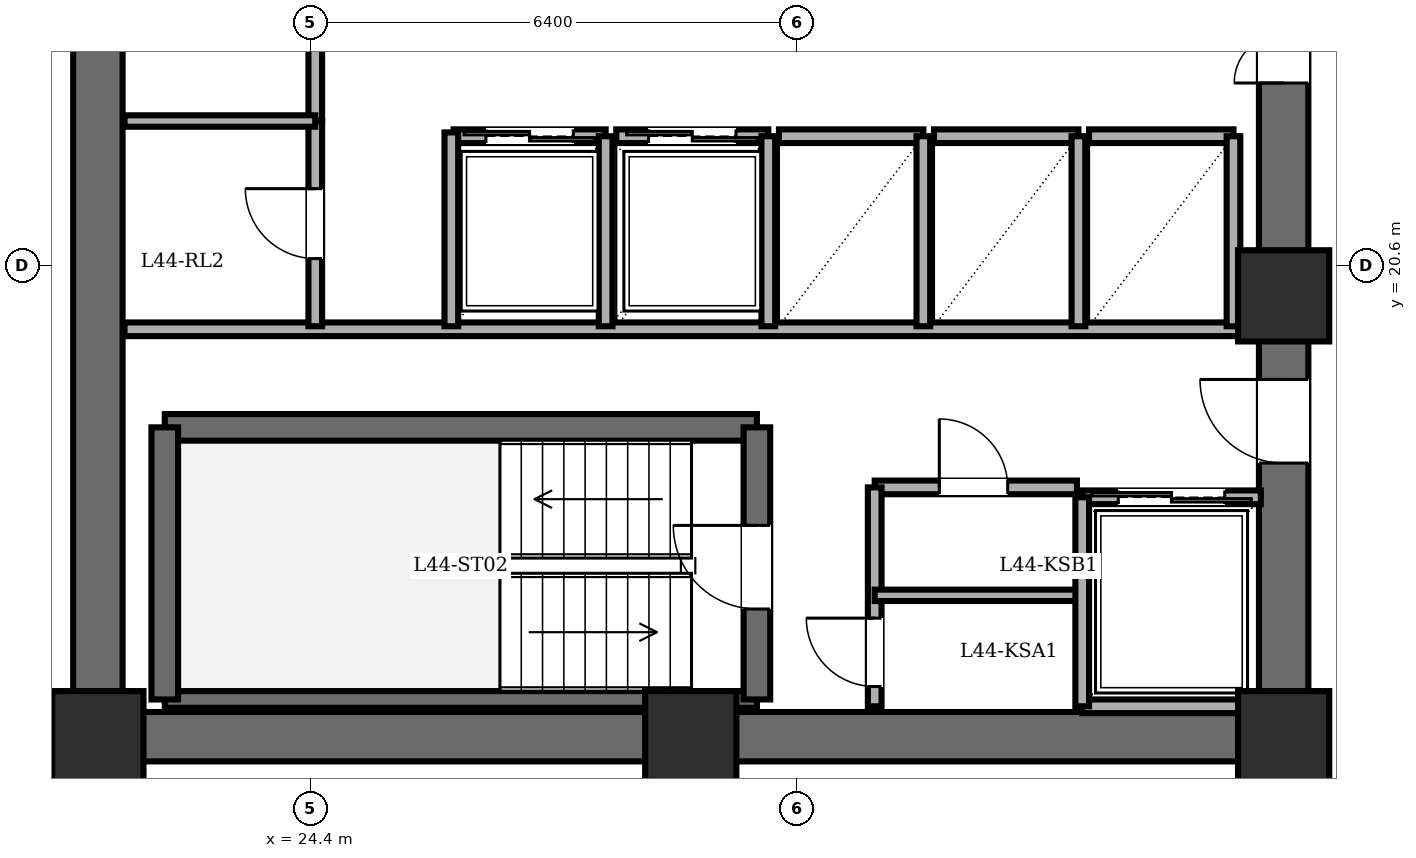
"""IFC4 building model, lengths in metres.
Left out: names, types, materials, properties, quantities, classifications, styles, units other than length and angle.
Written with IfcOpenShell. Run it as: python <this file> out.ifc"""

import sys

from ifc_helpers import new_model, si_unit, direction, frame, frame_2d, origin, origin_2d, place, context, subcontext, project, spatial, rectangle, extrude, element, fill, save


model = new_model("IFC4")
c1 = context("Model", 3, precision=1e-05, world=origin(), true_north=direction((0.0, 1.0)))
c2 = subcontext(c1, "Body", "Model", "MODEL_VIEW")
j1 = project(units=[si_unit("LENGTHUNIT", "METRE"), si_unit("PLANEANGLEUNIT", "RADIAN")], contexts=[c1])
p1 = place(None, origin())
s1 = spatial("IfcSite", under=j1, at=p1, CompositionType="ELEMENT")
p2 = place(p1, origin())
s2 = spatial("IfcBuilding", under=s1, at=p2, CompositionType="ELEMENT")
p3 = place(p2, frame((0.0, 0.0, 169.0)))
s3 = spatial("IfcBuildingStorey", under=s2, at=p3, CompositionType="ELEMENT", Elevation=169.0)
for number, where, z_axis, x_axis in (
    (1, (21.6, 14.4, 0.0), (0.0, 0.0, 1.0), (1.0, 0.0, 0.0)),
    (2, (29.4, 14.4, 0.0), (0.0, 0.0, 1.0), (1.0, 0.0, 0.0)),
    (3, (37.2, 14.4, 0.0), (0.0, 0.0, 1.0), (1.0, 0.0, 0.0)),
    (4, (37.2, 20.2, 0.0), (0.0, 0.0, 1.0), (1.0, 0.0, 0.0)),
):
    element("IfcColumn", number, at=place(p3, frame(where, z_axis=z_axis, x_axis=x_axis)), inside=s3, PredefinedType="COLUMN", context=c2, shape_type="SweptSolid", body=[
        extrude(rectangle(XDim=1.2, YDim=1.2, at=origin_2d()), origin(), (0.0, 0.0, 1.0), 3.6),
    ])
p4 = place(p3, frame((21.6, 14.4, 0.0), z_axis=(0.0, 0.0, 1.0), x_axis=(0.0, 1.0, 0.0)))
e5 = element("IfcWall", 5, at=p4, inside=s3, PredefinedType="SHEAR", context=c2, shape_type="SweptSolid", body=[
    extrude(rectangle(XDim=19.2, YDim=0.65, at=frame_2d((9.6, 0.0))), origin(), (0.0, 0.0, 1.0), 3.4),
])
p5 = place(p3, frame((37.2, 14.4, 0.0), z_axis=(0.0, 0.0, 1.0), x_axis=(-1.0, 0.0, 0.0)))
e6 = element("IfcWall", 6, at=p5, inside=s3, PredefinedType="SHEAR", context=c2, shape_type="SweptSolid", body=[
    extrude(rectangle(XDim=15.6, YDim=0.65, at=frame_2d((7.8, 0.0))), origin(), (0.0, 0.0, 1.0), 3.4),
])
p6 = place(p3, frame((37.2, 14.4, 0.0), z_axis=(0.0, 0.0, 1.0), x_axis=(0.0, 1.0, 0.0)))
e7 = element("IfcWall", 7, at=p6, inside=s3, PredefinedType="SHEAR", context=c2, shape_type="SweptSolid", body=[
    extrude(rectangle(XDim=19.2, YDim=0.65, at=frame_2d((9.6, 0.0))), origin(), (0.0, 0.0, 1.0), 3.4),
])
p7 = place(p6, frame((15.8, 0.0, 0.0)))
e8 = element("IfcOpeningElement", 8, at=p7, cuts=e7, PredefinedType="OPENING", context=c2, shape_type="SweptSolid", body=[
    extrude(rectangle(XDim=1.15, YDim=2.15, at=frame_2d((0.575, 1.075))), frame((0.0, 0.335, 0.0), z_axis=(0.0, -1.0, 0.0), x_axis=(1.0, 0.0, 0.0)), (0.0, 0.0, 1.0), 0.67),
])
p8 = place(p6, frame((3.6, 0.0, 0.0)))
e9 = element("IfcOpeningElement", 9, at=p8, cuts=e7, PredefinedType="OPENING", context=c2, shape_type="SweptSolid", body=[
    extrude(rectangle(XDim=1.1, YDim=2.15, at=frame_2d((0.55, 1.075))), frame((0.0, 0.335, 0.0), z_axis=(0.0, -1.0, 0.0), x_axis=(1.0, 0.0, 0.0)), (0.0, 0.0, 1.0), 0.67),
])
p9 = place(p6, frame((8.6, 0.0, 0.0)))
e10 = element("IfcOpeningElement", 10, at=p9, cuts=e7, PredefinedType="OPENING", context=c2, shape_type="SweptSolid", body=[
    extrude(rectangle(XDim=1.3, YDim=2.2, at=frame_2d((0.65, 1.1))), frame((0.0, 0.335, 0.0), z_axis=(0.0, -1.0, 0.0), x_axis=(1.0, 0.0, 0.0)), (0.0, 0.0, 1.0), 0.67),
])
p10 = place(p3, frame((22.48, 18.47, 0.0), z_axis=(0.0, 0.0, 1.0), x_axis=(1.0, 0.0, 0.0)))
e11 = element("IfcWall", 11, at=p10, inside=s3, PredefinedType="SOLIDWALL", context=c2, shape_type="SweptSolid", body=[
    extrude(rectangle(XDim=7.79, YDim=0.35, at=frame_2d((3.895, 0.0))), origin(), (0.0, 0.0, 1.0), 3.4),
])
p11 = place(p3, frame((22.48, 14.89, 0.0), z_axis=(0.0, 0.0, 1.0), x_axis=(1.0, 0.0, 0.0)))
e12 = element("IfcWall", 12, at=p11, inside=s3, PredefinedType="PARTITIONING", context=c2, shape_type="SweptSolid", body=[
    extrude(rectangle(XDim=7.79, YDim=0.22, at=frame_2d((3.895, 0.0))), origin(), (0.0, 0.0, 1.0), 3.4),
])
p12 = place(p3, frame((22.48, 14.89, 0.0), z_axis=(0.0, 0.0, 1.0), x_axis=(0.0, 1.0, 0.0)))
e13 = element("IfcWall", 13, at=p12, inside=s3, PredefinedType="SOLIDWALL", context=c2, shape_type="SweptSolid", body=[
    extrude(rectangle(XDim=3.58, YDim=0.35, at=frame_2d((1.79, 0.0))), origin(), (0.0, 0.0, 1.0), 3.4),
])
p13 = place(p3, frame((30.27, 14.89, 0.0), z_axis=(0.0, 0.0, 1.0), x_axis=(0.0, 1.0, 0.0)))
e14 = element("IfcWall", 14, at=p13, inside=s3, PredefinedType="SOLIDWALL", context=c2, shape_type="SweptSolid", body=[
    extrude(rectangle(XDim=3.58, YDim=0.35, at=frame_2d((1.79, 0.0))), origin(), (0.0, 0.0, 1.0), 3.4),
])
p14 = place(p13, frame((1.19, 0.0, 0.0)))
e15 = element("IfcOpeningElement", 15, at=p14, cuts=e14, PredefinedType="OPENING", context=c2, shape_type="SweptSolid", body=[
    extrude(rectangle(XDim=1.1, YDim=2.15, at=frame_2d((0.55, 1.075))), frame((0.0, 0.185, 0.0), z_axis=(0.0, -1.0, 0.0), x_axis=(1.0, 0.0, 0.0)), (0.0, 0.0, 1.0), 0.37),
])
p15 = place(p3, frame((21.95, 19.76, 0.0), z_axis=(0.0, 0.0, 1.0), x_axis=(1.0, 0.0, 0.0)))
e16 = element("IfcWall", 16, at=p15, inside=s3, PredefinedType="PARTITIONING", context=c2, shape_type="SweptSolid", body=[
    extrude(rectangle(XDim=14.87, YDim=0.18, at=frame_2d((7.435, 0.0))), origin(), (0.0, 0.0, 1.0), 3.4),
])
p16 = place(p3, frame((31.82, 17.68, 0.0), z_axis=(0.0, 0.0, 1.0), x_axis=(1.0, 0.0, 0.0)))
e17 = element("IfcWall", 17, at=p16, inside=s3, PredefinedType="PARTITIONING", context=c2, shape_type="SweptSolid", body=[
    extrude(rectangle(XDim=2.66, YDim=0.18, at=frame_2d((1.33, 0.0))), origin(), (0.0, 0.0, 1.0), 3.4),
])
p17 = place(p16, frame((0.85, 0.0, 0.0)))
e18 = element("IfcOpeningElement", 18, at=p17, cuts=e17, PredefinedType="OPENING", context=c2, shape_type="SweptSolid", body=[
    extrude(rectangle(XDim=0.9, YDim=2.05, at=frame_2d((0.45, 1.025))), frame((0.0, 0.1, 0.0), z_axis=(0.0, -1.0, 0.0), x_axis=(1.0, 0.0, 0.0)), (0.0, 0.0, 1.0), 0.2),
])
p18 = place(p3, frame((31.82, 14.8, 0.0), z_axis=(0.0, 0.0, 1.0), x_axis=(0.0, 1.0, 0.0)))
e19 = element("IfcWall", 19, at=p18, inside=s3, PredefinedType="PARTITIONING", context=c2, shape_type="SweptSolid", body=[
    extrude(rectangle(XDim=2.88, YDim=0.18, at=frame_2d((1.44, 0.0))), origin(), (0.0, 0.0, 1.0), 3.4),
])
p19 = place(p18, frame((0.26, 0.0, 0.0)))
e20 = element("IfcOpeningElement", 20, at=p19, cuts=e19, PredefinedType="OPENING", context=c2, shape_type="SweptSolid", body=[
    extrude(rectangle(XDim=0.9, YDim=2.05, at=frame_2d((0.45, 1.025))), frame((0.0, 0.1, 0.0), z_axis=(0.0, -1.0, 0.0), x_axis=(1.0, 0.0, 0.0)), (0.0, 0.0, 1.0), 0.2),
])
p20 = place(p3, frame((31.82, 16.26, 0.0), z_axis=(0.0, 0.0, 1.0), x_axis=(1.0, 0.0, 0.0)))
e21 = element("IfcWall", 21, at=p20, inside=s3, PredefinedType="PARTITIONING", context=c2, shape_type="SweptSolid", body=[
    extrude(rectangle(XDim=2.66, YDim=0.15, at=frame_2d((1.33, 0.0))), origin(), (0.0, 0.0, 1.0), 3.4),
])
p21 = place(p3, frame((34.55, 17.55, 0.0), z_axis=(0.0, 0.0, 1.0), x_axis=(1.0, 0.0, 0.0)))
e22 = element("IfcWall", 22, at=p21, inside=s3, PredefinedType="PARTITIONING", context=c2, shape_type="SweptSolid", body=[
    extrude(rectangle(XDim=2.35, YDim=0.18, at=frame_2d((1.175, 0.0))), origin(), (0.0, 0.0, 1.0), 3.4),
])
p22 = place(p21, frame((0.475, 0.0, 0.0)))
e23 = element("IfcOpeningElement", 23, at=p22, cuts=e22, PredefinedType="OPENING", context=c2, shape_type="SweptSolid", body=[
    extrude(rectangle(XDim=1.4, YDim=2.3, at=frame_2d((0.7, 1.15))), frame((0.0, 0.1, 0.0), z_axis=(0.0, -1.0, 0.0), x_axis=(1.0, 0.0, 0.0)), (0.0, 0.0, 1.0), 0.2),
])
p23 = place(p3, frame((36.9, 14.8, 0.0), z_axis=(0.0, 0.0, 1.0), x_axis=(-1.0, 0.0, 0.0)))
e24 = element("IfcWall", 24, at=p23, inside=s3, PredefinedType="PARTITIONING", context=c2, shape_type="SweptSolid", body=[
    extrude(rectangle(XDim=2.35, YDim=0.18, at=frame_2d((1.175, 0.0))), origin(), (0.0, 0.0, 1.0), 3.4),
])
p24 = place(p3, frame((34.55, 17.55, 0.0), z_axis=(0.0, 0.0, 1.0), x_axis=(0.0, -1.0, 0.0)))
e25 = element("IfcWall", 25, at=p24, inside=s3, PredefinedType="PARTITIONING", context=c2, shape_type="SweptSolid", body=[
    extrude(rectangle(XDim=2.75, YDim=0.18, at=frame_2d((1.375, 0.0))), origin(), (0.0, 0.0, 1.0), 3.4),
])
p25 = place(p3, frame((26.28, 22.3, 0.0), z_axis=(0.0, 0.0, 1.0), x_axis=(1.0, 0.0, 0.0)))
e26 = element("IfcWall", 26, at=p25, inside=s3, PredefinedType="PARTITIONING", context=c2, shape_type="SweptSolid", body=[
    extrude(rectangle(XDim=2.0, YDim=0.18, at=frame_2d((1.0, 0.0))), origin(), (0.0, 0.0, 1.0), 3.4),
])
p26 = place(p25, frame((0.425, 0.0, 0.0)))
e27 = element("IfcOpeningElement", 27, at=p26, cuts=e26, PredefinedType="OPENING", context=c2, shape_type="SweptSolid", body=[
    extrude(rectangle(XDim=1.15, YDim=2.2, at=frame_2d((0.575, 1.1))), frame((0.0, 0.1, 0.0), z_axis=(0.0, -1.0, 0.0), x_axis=(1.0, 0.0, 0.0)), (0.0, 0.0, 1.0), 0.2),
])
p27 = place(p3, frame((28.28, 19.8, 0.0), z_axis=(0.0, 0.0, 1.0), x_axis=(0.0, 1.0, 0.0)))
e28 = element("IfcWall", 28, at=p27, inside=s3, PredefinedType="PARTITIONING", context=c2, shape_type="SweptSolid", body=[
    extrude(rectangle(XDim=2.5, YDim=0.18, at=frame_2d((1.25, 0.0))), origin(), (0.0, 0.0, 1.0), 3.4),
])
p28 = place(p3, frame((28.42, 22.3, 0.0), z_axis=(0.0, 0.0, 1.0), x_axis=(1.0, 0.0, 0.0)))
e29 = element("IfcWall", 29, at=p28, inside=s3, PredefinedType="PARTITIONING", context=c2, shape_type="SweptSolid", body=[
    extrude(rectangle(XDim=2.0, YDim=0.18, at=frame_2d((1.0, 0.0))), origin(), (0.0, 0.0, 1.0), 3.4),
])
p29 = place(p28, frame((0.425, 0.0, 0.0)))
e30 = element("IfcOpeningElement", 30, at=p29, cuts=e29, PredefinedType="OPENING", context=c2, shape_type="SweptSolid", body=[
    extrude(rectangle(XDim=1.15, YDim=2.2, at=frame_2d((0.575, 1.1))), frame((0.0, 0.1, 0.0), z_axis=(0.0, -1.0, 0.0), x_axis=(1.0, 0.0, 0.0)), (0.0, 0.0, 1.0), 0.2),
])
p30 = place(p3, frame((30.42, 19.8, 0.0), z_axis=(0.0, 0.0, 1.0), x_axis=(0.0, 1.0, 0.0)))
e31 = element("IfcWall", 31, at=p30, inside=s3, PredefinedType="PARTITIONING", context=c2, shape_type="SweptSolid", body=[
    extrude(rectangle(XDim=2.5, YDim=0.18, at=frame_2d((1.25, 0.0))), origin(), (0.0, 0.0, 1.0), 3.4),
])
p31 = place(p3, frame((30.56, 22.3, 0.0), z_axis=(0.0, 0.0, 1.0), x_axis=(1.0, 0.0, 0.0)))
e32 = element("IfcWall", 32, at=p31, inside=s3, PredefinedType="PARTITIONING", context=c2, shape_type="SweptSolid", body=[
    extrude(rectangle(XDim=1.9, YDim=0.18, at=frame_2d((0.95, 0.0))), origin(), (0.0, 0.0, 1.0), 3.4),
])
p32 = place(p3, frame((32.46, 19.8, 0.0), z_axis=(0.0, 0.0, 1.0), x_axis=(0.0, 1.0, 0.0)))
e33 = element("IfcWall", 33, at=p32, inside=s3, PredefinedType="PARTITIONING", context=c2, shape_type="SweptSolid", body=[
    extrude(rectangle(XDim=2.5, YDim=0.18, at=frame_2d((1.25, 0.0))), origin(), (0.0, 0.0, 1.0), 3.4),
])
p33 = place(p3, frame((32.6, 22.3, 0.0), z_axis=(0.0, 0.0, 1.0), x_axis=(1.0, 0.0, 0.0)))
e34 = element("IfcWall", 34, at=p33, inside=s3, PredefinedType="PARTITIONING", context=c2, shape_type="SweptSolid", body=[
    extrude(rectangle(XDim=1.9, YDim=0.18, at=frame_2d((0.95, 0.0))), origin(), (0.0, 0.0, 1.0), 3.4),
])
p34 = place(p3, frame((34.5, 19.8, 0.0), z_axis=(0.0, 0.0, 1.0), x_axis=(0.0, 1.0, 0.0)))
e35 = element("IfcWall", 35, at=p34, inside=s3, PredefinedType="PARTITIONING", context=c2, shape_type="SweptSolid", body=[
    extrude(rectangle(XDim=2.5, YDim=0.18, at=frame_2d((1.25, 0.0))), origin(), (0.0, 0.0, 1.0), 3.4),
])
p35 = place(p3, frame((34.64, 22.3, 0.0), z_axis=(0.0, 0.0, 1.0), x_axis=(1.0, 0.0, 0.0)))
e36 = element("IfcWall", 36, at=p35, inside=s3, PredefinedType="PARTITIONING", context=c2, shape_type="SweptSolid", body=[
    extrude(rectangle(XDim=1.9, YDim=0.18, at=frame_2d((0.95, 0.0))), origin(), (0.0, 0.0, 1.0), 3.4),
])
p36 = place(p3, frame((36.54, 19.8, 0.0), z_axis=(0.0, 0.0, 1.0), x_axis=(0.0, 1.0, 0.0)))
e37 = element("IfcWall", 37, at=p36, inside=s3, PredefinedType="PARTITIONING", context=c2, shape_type="SweptSolid", body=[
    extrude(rectangle(XDim=2.5, YDim=0.18, at=frame_2d((1.25, 0.0))), origin(), (0.0, 0.0, 1.0), 3.4),
])
p37 = place(p3, frame((24.46, 22.5, 0.0), z_axis=(0.0, 0.0, 1.0), x_axis=(0.0, 1.0, 0.0)))
e38 = element("IfcWall", 38, at=p37, inside=s3, PredefinedType="PARTITIONING", context=c2, shape_type="SweptSolid", body=[
    extrude(rectangle(XDim=5.0, YDim=0.18, at=frame_2d((2.5, 0.0))), origin(), (0.0, 0.0, 1.0), 3.4),
])
p38 = place(p37, frame((2.04, 0.0, 0.0)))
e39 = element("IfcOpeningElement", 39, at=p38, cuts=e38, PredefinedType="OPENING", context=c2, shape_type="SweptSolid", body=[
    extrude(rectangle(XDim=0.92, YDim=2.1, at=frame_2d((0.46, 1.05))), frame((0.0, 0.1, 0.0), z_axis=(0.0, -1.0, 0.0), x_axis=(1.0, 0.0, 0.0)), (0.0, 0.0, 1.0), 0.2),
])
p39 = place(p3, frame((24.46, 19.8, 0.0), z_axis=(0.0, 0.0, 1.0), x_axis=(0.0, 1.0, 0.0)))
e40 = element("IfcWall", 40, at=p39, inside=s3, PredefinedType="PARTITIONING", context=c2, shape_type="SweptSolid", body=[
    extrude(rectangle(XDim=2.7, YDim=0.18, at=frame_2d((1.35, 0.0))), origin(), (0.0, 0.0, 1.0), 3.4),
])
p40 = place(p39, frame((0.89, 0.0, 0.0)))
e41 = element("IfcOpeningElement", 41, at=p40, cuts=e40, PredefinedType="OPENING", context=c2, shape_type="SweptSolid", body=[
    extrude(rectangle(XDim=0.92, YDim=2.1, at=frame_2d((0.46, 1.05))), frame((0.0, 0.1, 0.0), z_axis=(0.0, -1.0, 0.0), x_axis=(1.0, 0.0, 0.0)), (0.0, 0.0, 1.0), 0.2),
])
p41 = place(p3, frame((21.95, 22.5, 0.0), z_axis=(0.0, 0.0, 1.0), x_axis=(1.0, 0.0, 0.0)))
e42 = element("IfcWall", 42, at=p41, inside=s3, PredefinedType="PARTITIONING", context=c2, shape_type="SweptSolid", body=[
    extrude(rectangle(XDim=2.51, YDim=0.15, at=frame_2d((1.255, 0.0))), origin(), (0.0, 0.0, 1.0), 3.4),
])
p42 = place(p3, frame((26.25, 19.8, 0.0), z_axis=(0.0, 0.0, 1.0), x_axis=(0.0, 1.0, 0.0)))
e43 = element("IfcWall", 43, at=p42, inside=s3, PredefinedType="PARTITIONING", context=c2, shape_type="SweptSolid", body=[
    extrude(rectangle(XDim=2.55, YDim=0.18, at=frame_2d((1.275, 0.0))), origin(), (0.0, 0.0, 1.0), 3.4),
])
p43 = place(p3, frame((13.8, 14.18, 0.0), z_axis=(0.0, 0.0, 1.0), x_axis=(1.0, 0.0, 0.0)))
e44 = element("IfcWall", 44, at=p43, inside=s3, PredefinedType="PARTITIONING", context=c2, shape_type="SweptSolid", body=[
    extrude(rectangle(XDim=7.68, YDim=0.15, at=frame_2d((3.84, 0.0))), origin(), (0.0, 0.0, 1.0), 3.4),
])
p44 = place(p43, frame((3.68, 0.0, 0.0)))
e45 = element("IfcOpeningElement", 45, at=p44, cuts=e44, PredefinedType="OPENING", context=c2, shape_type="SweptSolid", body=[
    extrude(rectangle(XDim=1.0, YDim=2.15, at=frame_2d((0.5, 1.075))), frame((0.0, 0.085, 0.0), z_axis=(0.0, -1.0, 0.0), x_axis=(1.0, 0.0, 0.0)), (0.0, 0.0, 1.0), 0.17),
])
p45 = place(p14, origin())
e46 = element("IfcDoor", 46, at=p45, inside=s3, OperationType="SINGLE_SWING_RIGHT", PredefinedType="DOOR", context=c2, shape_type="SweptSolid", body=[
    extrude(rectangle(XDim=1.1, YDim=2.15, at=frame_2d((0.55, 1.075))), frame((0.0, 0.025, 0.0), z_axis=(0.0, -1.0, 0.0), x_axis=(1.0, 0.0, 0.0)), (0.0, 0.0, 1.0), 0.05),
])
fill(e15, e46)
p46 = place(p8, origin())
e47 = element("IfcDoor", 47, at=p46, inside=s3, OperationType="SINGLE_SWING_RIGHT", PredefinedType="DOOR", context=c2, shape_type="SweptSolid", body=[
    extrude(rectangle(XDim=1.1, YDim=2.15, at=frame_2d((0.55, 1.075))), frame((0.0, 0.025, 0.0), z_axis=(0.0, -1.0, 0.0), x_axis=(1.0, 0.0, 0.0)), (0.0, 0.0, 1.0), 0.05),
])
fill(e9, e47)
p47 = place(p17, origin())
e48 = element("IfcDoor", 48, at=p47, inside=s3, OperationType="SINGLE_SWING_LEFT", PredefinedType="DOOR", context=c2, shape_type="SweptSolid", body=[
    extrude(rectangle(XDim=0.9, YDim=2.05, at=frame_2d((0.45, 1.025))), frame((0.0, 0.025, 0.0), z_axis=(0.0, -1.0, 0.0), x_axis=(1.0, 0.0, 0.0)), (0.0, 0.0, 1.0), 0.05),
])
fill(e18, e48)
p48 = place(p19, origin())
e49 = element("IfcDoor", 49, at=p48, inside=s3, OperationType="SINGLE_SWING_RIGHT", PredefinedType="DOOR", context=c2, shape_type="SweptSolid", body=[
    extrude(rectangle(XDim=0.9, YDim=2.05, at=frame_2d((0.45, 1.025))), frame((0.0, 0.025, 0.0), z_axis=(0.0, -1.0, 0.0), x_axis=(1.0, 0.0, 0.0)), (0.0, 0.0, 1.0), 0.05),
])
fill(e20, e49)
p49 = place(p22, origin())
e50 = element("IfcDoor", 50, at=p49, inside=s3, OperationType="DOUBLE_DOOR_SLIDING", PredefinedType="DOOR", context=c2, shape_type="SweptSolid", body=[
    extrude(rectangle(XDim=1.4, YDim=2.3, at=frame_2d((0.7, 1.15))), frame((0.0, 0.025, 0.0), z_axis=(0.0, -1.0, 0.0), x_axis=(1.0, 0.0, 0.0)), (0.0, 0.0, 1.0), 0.05),
])
fill(e23, e50)
p50 = place(p26, origin())
e51 = element("IfcDoor", 51, at=p50, inside=s3, OperationType="DOUBLE_DOOR_SLIDING", PredefinedType="DOOR", context=c2, shape_type="SweptSolid", body=[
    extrude(rectangle(XDim=1.15, YDim=2.2, at=frame_2d((0.575, 1.1))), frame((0.0, 0.025, 0.0), z_axis=(0.0, -1.0, 0.0), x_axis=(1.0, 0.0, 0.0)), (0.0, 0.0, 1.0), 0.05),
])
fill(e27, e51)
p51 = place(p29, origin())
e52 = element("IfcDoor", 52, at=p51, inside=s3, OperationType="DOUBLE_DOOR_SLIDING", PredefinedType="DOOR", context=c2, shape_type="SweptSolid", body=[
    extrude(rectangle(XDim=1.15, YDim=2.2, at=frame_2d((0.575, 1.1))), frame((0.0, 0.025, 0.0), z_axis=(0.0, -1.0, 0.0), x_axis=(1.0, 0.0, 0.0)), (0.0, 0.0, 1.0), 0.05),
])
fill(e30, e52)
p52 = place(p40, origin())
e53 = element("IfcDoor", 53, at=p52, inside=s3, OperationType="SINGLE_SWING_RIGHT", PredefinedType="DOOR", context=c2, shape_type="SweptSolid", body=[
    extrude(rectangle(XDim=0.92, YDim=2.1, at=frame_2d((0.46, 1.05))), frame((0.0, 0.025, 0.0), z_axis=(0.0, -1.0, 0.0), x_axis=(1.0, 0.0, 0.0)), (0.0, 0.0, 1.0), 0.05),
])
fill(e41, e53)
p53 = place(p9, origin())
e54 = element("IfcDoor", 54, at=p53, inside=s3, OperationType="DOUBLE_DOOR_SINGLE_SWING", PredefinedType="DOOR", context=c2, shape_type="SweptSolid", body=[
    extrude(rectangle(XDim=1.3, YDim=2.2, at=frame_2d((0.65, 1.1))), frame((0.0, 0.025, 0.0), z_axis=(0.0, -1.0, 0.0), x_axis=(1.0, 0.0, 0.0)), (0.0, 0.0, 1.0), 0.05),
])
fill(e10, e54)
save(model, sys.argv[1])
